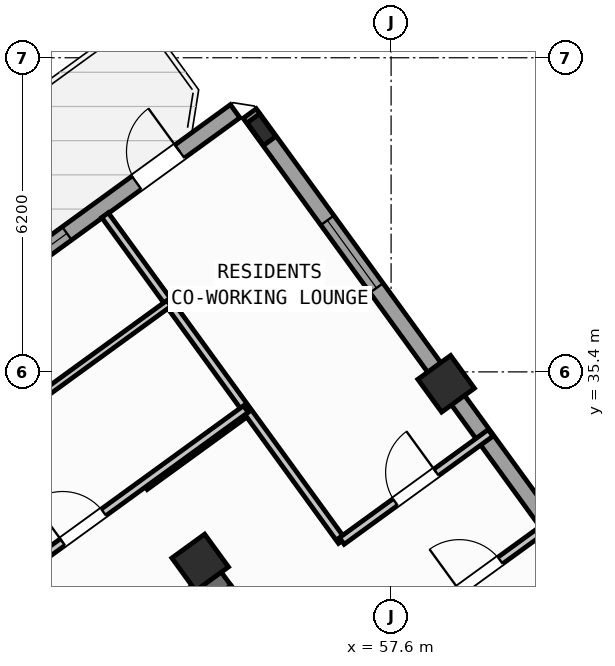
"""IFC4 building model, lengths in metres.
Left out: names, types, materials, properties, quantities, classifications, styles, units other than length and angle.
Written with IfcOpenShell. Run it as: python <this file> out.ifc"""

import sys

from ifc_helpers import new_model, si_unit, direction, frame, frame_2d, origin, origin_2d, place, context, subcontext, project, spatial, rectangle, hollow_rectangle, i_section, extrude, source, transform, mapped, element, fill, save


model = new_model("IFC4")
c1 = context("Model", 3, precision=1e-05, world=origin(), true_north=direction((0.0, 1.0)))
c2 = subcontext(c1, "Body", "Model", "MODEL_VIEW")
j1 = project(units=[si_unit("LENGTHUNIT", "METRE"), si_unit("PLANEANGLEUNIT", "RADIAN")], contexts=[c1])
p1 = place(None, origin())
s1 = spatial("IfcSite", under=j1, at=p1, CompositionType="ELEMENT")
p2 = place(p1, origin())
s2 = spatial("IfcBuilding", under=s1, at=p2, CompositionType="ELEMENT")
p3 = place(p2, frame((0.0, 0.0, 222.0)))
s3 = spatial("IfcBuildingStorey", under=s2, at=p3, CompositionType="ELEMENT", Elevation=222.0)
p4 = place(p3, frame((44.406, 24.172, 0.0), z_axis=(0.0, 0.0, 1.0), x_axis=(0.809012867805, 0.587790931986, 0.0)))
e1 = element("IfcWall", 1, at=p4, inside=s3, PredefinedType="SHEAR", context=c2, shape_type="SweptSolid", body=[
    extrude(rectangle(XDim=12.24, YDim=0.45, at=frame_2d((6.12, 0.0))), origin(), (0.0, 0.0, 1.0), 3.35),
])
p5 = place(p3, frame((58.064, 25.813, 0.0), z_axis=(0.0, 0.0, 1.0), x_axis=(-0.587774812919, 0.809024578921, 0.0)))
e2 = element("IfcWall", 2, at=p5, inside=s3, PredefinedType="SHEAR", context=c2, shape_type="SweptSolid", body=[
    extrude(rectangle(XDim=6.475, YDim=0.45, at=frame_2d((3.238, 0.0))), origin(), (0.0, 0.0, 1.0), 3.35),
])
m1 = source(origin(), c2, "Body", "SweptSolid", [
    extrude(hollow_rectangle(XDim=0.8, YDim=0.8, WallThickness=0.032, at=origin_2d()), origin(), (0.0, 0.0, 1.0), 3.6),
])
for number, where, z_axis, x_axis in (
    (3, (53.832, 31.638, 0.0), (0.0, 0.0, 1.0), (0.809, 0.588, 0.0)),
    (4, (58.686, 35.165, 0.0), (0.0, 0.0, 1.0), (0.809, 0.588, 0.0)),
):
    element("IfcColumn", number, at=place(p3, frame(where, z_axis=z_axis, x_axis=x_axis)), inside=s3, PredefinedType="COLUMN", context=c2, shape_type="MappedRepresentation", body=[
        mapped(m1, transform((0.0, 0.0, 0.0), scale=1.0)),
    ])
m2 = source(origin(), c2, "Body", "SweptSolid", [
    extrude(i_section(OverallWidth=0.3, OverallDepth=0.55, WebThickness=0.015, FlangeThickness=0.029, at=origin_2d()), origin(), (0.0, 0.0, 1.0), 3.6),
])
p6 = place(p3, frame((55.042, 40.181, 0.0), z_axis=(0.0, 0.0, 1.0), x_axis=(0.809016994375, 0.587785252292, 0.0)))
e5 = element("IfcColumn", 5, at=p6, inside=s3, PredefinedType="COLUMN", context=c2, shape_type="MappedRepresentation", body=[
    mapped(m2, transform((0.0, 0.0, 0.0), scale=1.0)),
])
p7 = place(p3, frame((42.207, 31.597, 0.0), z_axis=(0.0, 0.0, 1.0), x_axis=(0.809020333377, 0.587780656523, 0.0)))
e6 = element("IfcWall", 6, at=p7, inside=s3, PredefinedType="STANDARD", context=c2, shape_type="SweptSolid", body=[
    extrude(rectangle(XDim=15.223, YDim=0.32, at=frame_2d((7.611, 0.0))), origin(), (0.0, 0.0, 1.0), 3.35),
])
p8 = place(p7, frame((12.82, 0.0, 0.0)))
e7 = element("IfcOpeningElement", 7, at=p8, cuts=e6, PredefinedType="OPENING", context=c2, shape_type="SweptSolid", body=[
    extrude(rectangle(XDim=1.05, YDim=2.15, at=frame_2d((0.525, 1.075))), frame((0.0, 0.17, 0.0), z_axis=(0.0, -1.0, 0.0), x_axis=(1.0, 0.0, 0.0)), (0.0, 0.0, 1.0), 0.34),
])
p9 = place(p7, frame((1.745, 0.0, 0.9)))
e8 = element("IfcOpeningElement", 8, at=p9, cuts=e6, PredefinedType="OPENING", context=c2, shape_type="SweptSolid", body=[
    extrude(rectangle(XDim=1.65, YDim=1.45, at=frame_2d((0.825, 0.725))), frame((0.0, 0.17, 0.0), z_axis=(0.0, -1.0, 0.0), x_axis=(1.0, 0.0, 0.0)), (0.0, 0.0, 1.0), 0.34),
])
p10 = place(p7, frame((5.985, 0.0, 0.9)))
e9 = element("IfcOpeningElement", 9, at=p10, cuts=e6, PredefinedType="OPENING", context=c2, shape_type="SweptSolid", body=[
    extrude(rectangle(XDim=1.65, YDim=1.45, at=frame_2d((0.825, 0.725))), frame((0.0, 0.17, 0.0), z_axis=(0.0, -1.0, 0.0), x_axis=(1.0, 0.0, 0.0)), (0.0, 0.0, 1.0), 0.34),
])
p11 = place(p7, frame((10.219, 0.0, 1.0)))
e10 = element("IfcOpeningElement", 10, at=p11, cuts=e6, PredefinedType="OPENING", context=c2, shape_type="SweptSolid", body=[
    extrude(rectangle(XDim=0.9, YDim=1.25, at=frame_2d((0.45, 0.625))), frame((0.0, 0.17, 0.0), z_axis=(0.0, -1.0, 0.0), x_axis=(1.0, 0.0, 0.0)), (0.0, 0.0, 1.0), 0.34),
])
p12 = place(p3, frame((54.81, 40.5, 0.0), z_axis=(0.0, 0.0, 1.0), x_axis=(0.587783625747, -0.809018176127, 0.0)))
e11 = element("IfcWall", 11, at=p12, inside=s3, PredefinedType="STANDARD", context=c2, shape_type="SweptSolid", body=[
    extrude(rectangle(XDim=21.587, YDim=0.32, at=frame_2d((10.794, 0.0))), origin(), (0.0, 0.0, 1.0), 2.825),
])
p13 = place(p12, frame((2.606, 0.0, 0.9)))
e12 = element("IfcOpeningElement", 12, at=p13, cuts=e11, PredefinedType="OPENING", context=c2, shape_type="SweptSolid", body=[
    extrude(rectangle(XDim=1.65, YDim=1.45, at=frame_2d((0.825, 0.725))), frame((0.0, 0.17, 0.0), z_axis=(0.0, -1.0, 0.0), x_axis=(1.0, 0.0, 0.0)), (0.0, 0.0, 1.0), 0.34),
])
p14 = place(p12, frame((11.184, 0.0, 0.9)))
e13 = element("IfcOpeningElement", 13, at=p14, cuts=e11, PredefinedType="OPENING", context=c2, shape_type="SweptSolid", body=[
    extrude(rectangle(XDim=1.35, YDim=1.45, at=frame_2d((0.675, 0.725))), frame((0.0, 0.17, 0.0), z_axis=(0.0, -1.0, 0.0), x_axis=(1.0, 0.0, 0.0)), (0.0, 0.0, 1.0), 0.34),
])
p15 = place(p12, frame((15.202, 0.0, 1.0)))
e14 = element("IfcOpeningElement", 14, at=p15, cuts=e11, PredefinedType="OPENING", context=c2, shape_type="SweptSolid", body=[
    extrude(rectangle(XDim=0.9, YDim=1.25, at=frame_2d((0.45, 0.625))), frame((0.0, 0.17, 0.0), z_axis=(0.0, -1.0, 0.0), x_axis=(1.0, 0.0, 0.0)), (0.0, 0.0, 1.0), 0.34),
])
p16 = place(p12, frame((18.607, 0.0, 1.0)))
e15 = element("IfcOpeningElement", 15, at=p16, cuts=e11, PredefinedType="OPENING", context=c2, shape_type="SweptSolid", body=[
    extrude(rectangle(XDim=0.9, YDim=1.25, at=frame_2d((0.45, 0.625))), frame((0.0, 0.17, 0.0), z_axis=(0.0, -1.0, 0.0), x_axis=(1.0, 0.0, 0.0)), (0.0, 0.0, 1.0), 0.34),
])
p17 = place(p3, frame((52.739, 33.143, 0.0), z_axis=(0.0, 0.0, 1.0), x_axis=(0.809000999347, 0.58780726693, 0.0)))
e16 = element("IfcWall", 16, at=p17, inside=s3, PredefinedType="PARTITIONING", context=c2, shape_type="SweptSolid", body=[
    extrude(rectangle(XDim=2.51, YDim=0.16, at=frame_2d((1.255, 0.0))), origin(), (0.0, 0.0, 1.0), 3.34),
])
p18 = place(p3, frame((56.627, 32.062, 0.0), z_axis=(0.0, 0.0, 1.0), x_axis=(-0.587769918433, 0.809028134854, 0.0)))
e17 = element("IfcWall", 17, at=p18, inside=s3, PredefinedType="PARTITIONING", context=c2, shape_type="SweptSolid", body=[
    extrude(rectangle(XDim=7.95, YDim=0.16, at=frame_2d((3.975, 0.0))), origin(), (0.0, 0.0, 1.0), 3.34),
])
p19 = place(p3, frame((57.89, 30.323, 0.0), z_axis=(0.0, 0.0, 1.0), x_axis=(0.809035546126, 0.58775971715, 0.0)))
e18 = element("IfcWall", 18, at=p19, inside=s3, PredefinedType="PARTITIONING", context=c2, shape_type="SweptSolid", body=[
    extrude(rectangle(XDim=3.63, YDim=0.16, at=frame_2d((1.815, 0.0))), origin(), (0.0, 0.0, 1.0), 3.34),
])
p20 = place(p19, frame((1.305, 0.0, 0.0)))
e19 = element("IfcOpeningElement", 19, at=p20, cuts=e18, PredefinedType="OPENING", context=c2, shape_type="SweptSolid", body=[
    extrude(rectangle(XDim=1.0, YDim=2.1, at=frame_2d((0.5, 1.05))), frame((0.0, 0.09, 0.0), z_axis=(0.0, -1.0, 0.0), x_axis=(1.0, 0.0, 0.0)), (0.0, 0.0, 1.0), 0.18),
])
p21 = place(p3, frame((56.627, 32.062, 0.0), z_axis=(0.0, 0.0, 1.0), x_axis=(0.809003564202, 0.587803736896, 0.0)))
e20 = element("IfcWall", 20, at=p21, inside=s3, PredefinedType="PARTITIONING", context=c2, shape_type="SweptSolid", body=[
    extrude(rectangle(XDim=3.63, YDim=0.16, at=frame_2d((1.815, 0.0))), origin(), (0.0, 0.0, 1.0), 3.34),
])
p22 = place(p21, frame((1.305, 0.0, 0.0)))
e21 = element("IfcOpeningElement", 21, at=p22, cuts=e20, PredefinedType="OPENING", context=c2, shape_type="SweptSolid", body=[
    extrude(rectangle(XDim=1.0, YDim=2.1, at=frame_2d((0.5, 1.05))), frame((0.0, 0.09, 0.0), z_axis=(0.0, -1.0, 0.0), x_axis=(1.0, 0.0, 0.0)), (0.0, 0.0, 1.0), 0.18),
])
p23 = place(p3, frame((42.866, 26.044, 0.0), z_axis=(0.0, 0.0, 1.0), x_axis=(0.809020254154, 0.587780765566, 0.0)))
e22 = element("IfcWall", 22, at=p23, inside=s3, PredefinedType="PARTITIONING", context=c2, shape_type="SweptSolid", body=[
    extrude(rectangle(XDim=14.67, YDim=0.16, at=frame_2d((7.335, 0.0))), origin(), (0.0, 0.0, 1.0), 3.34),
])
p24 = place(p23, frame((10.2, 0.0, 0.0)))
e23 = element("IfcOpeningElement", 23, at=p24, cuts=e22, PredefinedType="OPENING", context=c2, shape_type="SweptSolid", body=[
    extrude(rectangle(XDim=1.0, YDim=2.1, at=frame_2d((0.5, 1.05))), frame((0.0, 0.09, 0.0), z_axis=(0.0, -1.0, 0.0), x_axis=(1.0, 0.0, 0.0)), (0.0, 0.0, 1.0), 0.18),
])
p25 = place(p3, frame((42.377, 28.878, 0.0), z_axis=(0.0, 0.0, 1.0), x_axis=(0.809020411523, 0.587780548963, 0.0)))
e24 = element("IfcWall", 24, at=p25, inside=s3, PredefinedType="PLUMBINGWALL", context=c2, shape_type="SweptSolid", body=[
    extrude(rectangle(XDim=13.4, YDim=0.14, at=frame_2d((6.7, 0.0))), origin(), (0.0, 0.0, 1.0), 3.34),
])
p26 = place(p25, frame((8.94, 0.0, 0.0)))
e25 = element("IfcOpeningElement", 25, at=p26, cuts=e24, PredefinedType="OPENING", context=c2, shape_type="SweptSolid", body=[
    extrude(rectangle(XDim=0.92, YDim=2.08, at=frame_2d((0.46, 1.04))), frame((0.0, 0.08, 0.0), z_axis=(0.0, -1.0, 0.0), x_axis=(1.0, 0.0, 0.0)), (0.0, 0.0, 1.0), 0.16),
])
m3 = source(origin(), c2, "Body", "SweptSolid", [
    extrude(rectangle(XDim=1.05, YDim=2.15, at=frame_2d((0.525, 1.075))), frame((0.0, 0.025, 0.0), z_axis=(0.0, -1.0, 0.0), x_axis=(1.0, 0.0, 0.0)), (0.0, 0.0, 1.0), 0.05),
])
p27 = place(p8, origin())
e26 = element("IfcDoor", 26, at=p27, inside=s3, OperationType="SINGLE_SWING_RIGHT", PredefinedType="DOOR", context=c2, shape_type="MappedRepresentation", body=[
    mapped(m3, transform((0.0, 0.0, 0.0), scale=1.0)),
])
fill(e7, e26)
m4 = source(origin(), c2, "Body", "SweptSolid", [
    extrude(rectangle(XDim=0.9, YDim=1.25, at=frame_2d((0.45, 0.625))), frame((0.0, 0.03, 0.0), z_axis=(0.0, -1.0, 0.0), x_axis=(1.0, 0.0, 0.0)), (0.0, 0.0, 1.0), 0.06),
])
p28 = place(p11, origin())
e27 = element("IfcWindow", 27, at=p28, inside=s3, PartitioningType="SINGLE_PANEL", PredefinedType="WINDOW", context=c2, shape_type="MappedRepresentation", body=[
    mapped(m4, transform((0.0, 0.0, 0.0), scale=1.0)),
])
fill(e10, e27)
m5 = source(origin(), c2, "Body", "SweptSolid", [
    extrude(rectangle(XDim=1.65, YDim=1.45, at=frame_2d((0.825, 0.725))), frame((0.0, 0.03, 0.0), z_axis=(0.0, -1.0, 0.0), x_axis=(1.0, 0.0, 0.0)), (0.0, 0.0, 1.0), 0.06),
])
p29 = place(p13, origin())
e28 = element("IfcWindow", 28, at=p29, inside=s3, PartitioningType="SINGLE_PANEL", PredefinedType="WINDOW", context=c2, shape_type="MappedRepresentation", body=[
    mapped(m5, transform((0.0, 0.0, 0.0), scale=1.0)),
])
fill(e12, e28)
m6 = source(origin(), c2, "Body", "SweptSolid", [
    extrude(rectangle(XDim=1.0, YDim=2.1, at=frame_2d((0.5, 1.05))), frame((0.0, 0.025, 0.0), z_axis=(0.0, -1.0, 0.0), x_axis=(1.0, 0.0, 0.0)), (0.0, 0.0, 1.0), 0.05),
])
p30 = place(p22, origin())
e29 = element("IfcDoor", 29, at=p30, inside=s3, OperationType="SINGLE_SWING_RIGHT", PredefinedType="DOOR", context=c2, shape_type="MappedRepresentation", body=[
    mapped(m6, transform((0.0, 0.0, 0.0), scale=1.0)),
])
fill(e21, e29)
p31 = place(p20, origin())
e30 = element("IfcDoor", 30, at=p31, inside=s3, OperationType="SINGLE_SWING_LEFT", PredefinedType="DOOR", context=c2, shape_type="MappedRepresentation", body=[
    mapped(m6, transform((0.0, 0.0, 0.0), scale=1.0)),
])
fill(e19, e30)
p32 = place(p24, origin())
e31 = element("IfcDoor", 31, at=p32, inside=s3, OperationType="SINGLE_SWING_LEFT", PredefinedType="DOOR", context=c2, shape_type="MappedRepresentation", body=[
    mapped(m6, transform((0.0, 0.0, 0.0), scale=1.0)),
])
fill(e23, e31)
save(model, sys.argv[1])
